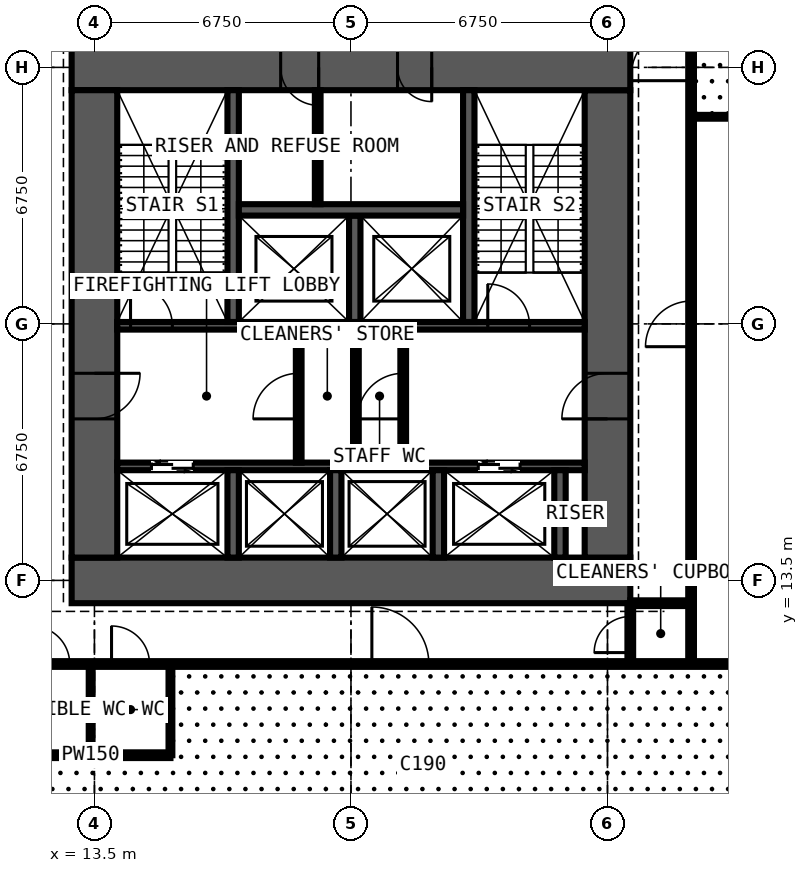
"""IFC4 building model, lengths in metres.
Left out: names, types, materials, properties, quantities, classifications, styles, units other than length and angle.
Written with IfcOpenShell. Run it as: python <this file> out.ifc"""

import sys

from ifc_helpers import new_model, si_unit, direction, frame, frame_2d, origin, place, context, subcontext, project, spatial, rectangle, extrude, element, fill, save


model = new_model("IFC4")
c1 = context("Model", 3, precision=1e-05, world=origin(), true_north=direction((0.0, 1.0)))
c2 = subcontext(c1, "Body", "Model", "MODEL_VIEW")
j1 = project(units=[si_unit("LENGTHUNIT", "METRE"), si_unit("PLANEANGLEUNIT", "RADIAN")], contexts=[c1])
p1 = place(None, origin())
s1 = spatial("IfcSite", under=j1, at=p1, CompositionType="ELEMENT")
p2 = place(p1, origin())
s2 = spatial("IfcBuilding", under=s1, at=p2, CompositionType="ELEMENT")
p3 = place(p2, frame((0.0, 0.0, 9.0)))
s3 = spatial("IfcBuildingStorey", under=s2, at=p3, CompositionType="ELEMENT", Elevation=9.0)
p4 = place(p3, frame((12.9, 13.5, 0.0), z_axis=(0.0, 0.0, 1.0), x_axis=(1.0, 0.0, 0.0)))
e1 = element("IfcWall", 1, at=p4, inside=s3, PredefinedType="SHEAR", context=c2, shape_type="SweptSolid", body=[
    extrude(rectangle(XDim=14.7, YDim=1.2, at=frame_2d((7.35, 0.0))), origin(), (0.0, 0.0, 1.0), 4.5),
])
p5 = place(p3, frame((27.0, 14.1, 0.0), z_axis=(0.0, 0.0, 1.0), x_axis=(0.0, 1.0, 0.0)))
e2 = element("IfcWall", 2, at=p5, inside=s3, PredefinedType="SHEAR", context=c2, shape_type="SweptSolid", body=[
    extrude(rectangle(XDim=12.3, YDim=1.2, at=frame_2d((6.15, 0.0))), origin(), (0.0, 0.0, 1.0), 4.5),
])
p6 = place(p5, frame((3.65, 0.0, 0.0)))
e3 = element("IfcOpeningElement", 3, at=p6, cuts=e2, PredefinedType="OPENING", context=c2, shape_type="SweptSolid", body=[
    extrude(rectangle(XDim=1.2, YDim=2.2, at=frame_2d((0.6, 1.1))), frame((0.0, 0.61, 0.0), z_axis=(0.0, -1.0, 0.0), x_axis=(1.0, 0.0, 0.0)), (0.0, 0.0, 1.0), 1.22),
])
p7 = place(p3, frame((27.6, 27.0, 0.0), z_axis=(0.0, 0.0, 1.0), x_axis=(-1.0, 0.0, 0.0)))
e4 = element("IfcWall", 4, at=p7, inside=s3, PredefinedType="SHEAR", context=c2, shape_type="SweptSolid", body=[
    extrude(rectangle(XDim=14.7, YDim=1.2, at=frame_2d((7.35, 0.0))), origin(), (0.0, 0.0, 1.0), 4.5),
])
p8 = place(p7, frame((5.225, 0.0, 0.0)))
e5 = element("IfcOpeningElement", 5, at=p8, cuts=e4, PredefinedType="OPENING", context=c2, shape_type="SweptSolid", body=[
    extrude(rectangle(XDim=0.9, YDim=2.2, at=frame_2d((0.45, 1.1))), frame((0.0, 0.61, 0.0), z_axis=(0.0, -1.0, 0.0), x_axis=(1.0, 0.0, 0.0)), (0.0, 0.0, 1.0), 1.22),
])
p9 = place(p7, frame((8.2, 0.0, 0.0)))
e6 = element("IfcOpeningElement", 6, at=p9, cuts=e4, PredefinedType="OPENING", context=c2, shape_type="SweptSolid", body=[
    extrude(rectangle(XDim=1.0, YDim=2.2, at=frame_2d((0.5, 1.1))), frame((0.0, 0.61, 0.0), z_axis=(0.0, -1.0, 0.0), x_axis=(1.0, 0.0, 0.0)), (0.0, 0.0, 1.0), 1.22),
])
p10 = place(p3, frame((13.5, 26.4, 0.0), z_axis=(0.0, 0.0, 1.0), x_axis=(0.0, -1.0, 0.0)))
e7 = element("IfcWall", 7, at=p10, inside=s3, PredefinedType="SHEAR", context=c2, shape_type="SweptSolid", body=[
    extrude(rectangle(XDim=12.3, YDim=1.2, at=frame_2d((6.15, 0.0))), origin(), (0.0, 0.0, 1.0), 4.5),
])
p11 = place(p10, frame((7.45, 0.0, 0.0)))
e8 = element("IfcOpeningElement", 8, at=p11, cuts=e7, PredefinedType="OPENING", context=c2, shape_type="SweptSolid", body=[
    extrude(rectangle(XDim=1.2, YDim=2.2, at=frame_2d((0.6, 1.1))), frame((0.0, 0.61, 0.0), z_axis=(0.0, -1.0, 0.0), x_axis=(1.0, 0.0, 0.0)), (0.0, 0.0, 1.0), 1.22),
])
p12 = place(p3, frame((14.1, 16.5, 0.0), z_axis=(0.0, 0.0, 1.0), x_axis=(1.0, 0.0, 0.0)))
e9 = element("IfcWall", 9, at=p12, inside=s3, PredefinedType="SHEAR", context=c2, shape_type="SweptSolid", body=[
    extrude(rectangle(XDim=12.3, YDim=0.2, at=frame_2d((6.15, 0.0))), origin(), (0.0, 0.0, 1.0), 4.5),
])
p13 = place(p12, frame((0.9, 0.0, 0.0)))
e10 = element("IfcOpeningElement", 10, at=p13, cuts=e9, PredefinedType="OPENING", context=c2, shape_type="SweptSolid", body=[
    extrude(rectangle(XDim=1.1, YDim=2.2, at=frame_2d((0.55, 1.1))), frame((0.0, 0.11, 0.0), z_axis=(0.0, -1.0, 0.0), x_axis=(1.0, 0.0, 0.0)), (0.0, 0.0, 1.0), 0.22),
])
p14 = place(p12, frame((9.5, 0.0, 0.0)))
e11 = element("IfcOpeningElement", 11, at=p14, cuts=e9, PredefinedType="OPENING", context=c2, shape_type="SweptSolid", body=[
    extrude(rectangle(XDim=1.1, YDim=2.2, at=frame_2d((0.55, 1.1))), frame((0.0, 0.11, 0.0), z_axis=(0.0, -1.0, 0.0), x_axis=(1.0, 0.0, 0.0)), (0.0, 0.0, 1.0), 0.22),
])
p15 = place(p3, frame((14.1, 20.2, 0.0), z_axis=(0.0, 0.0, 1.0), x_axis=(1.0, 0.0, 0.0)))
e12 = element("IfcWall", 12, at=p15, inside=s3, PredefinedType="SHEAR", context=c2, shape_type="SweptSolid", body=[
    extrude(rectangle(XDim=12.3, YDim=0.2, at=frame_2d((6.15, 0.0))), origin(), (0.0, 0.0, 1.0), 4.5),
])
p16 = place(p15, frame((0.35, 0.0, 0.0)))
e13 = element("IfcOpeningElement", 13, at=p16, cuts=e12, PredefinedType="OPENING", context=c2, shape_type="SweptSolid", body=[
    extrude(rectangle(XDim=1.1, YDim=2.2, at=frame_2d((0.55, 1.1))), frame((0.0, 0.11, 0.0), z_axis=(0.0, -1.0, 0.0), x_axis=(1.0, 0.0, 0.0)), (0.0, 0.0, 1.0), 0.22),
])
p17 = place(p15, frame((9.75, 0.0, 0.0)))
e14 = element("IfcOpeningElement", 14, at=p17, cuts=e12, PredefinedType="OPENING", context=c2, shape_type="SweptSolid", body=[
    extrude(rectangle(XDim=1.1, YDim=2.2, at=frame_2d((0.55, 1.1))), frame((0.0, 0.11, 0.0), z_axis=(0.0, -1.0, 0.0), x_axis=(1.0, 0.0, 0.0)), (0.0, 0.0, 1.0), 0.22),
])
for number, where, z_axis, x_axis in (
    (15, (17.15, 20.3, 0.0), (0.0, 0.0, 1.0), (0.0, 1.0, 0.0)),
    (16, (23.35, 20.3, 0.0), (0.0, 0.0, 1.0), (0.0, 1.0, 0.0)),
):
    element("IfcWall", number, at=place(p3, frame(where, z_axis=z_axis, x_axis=x_axis)), inside=s3, PredefinedType="SHEAR", context=c2, shape_type="SweptSolid", body=[
        extrude(rectangle(XDim=6.1, YDim=0.3, at=frame_2d((3.05, 0.0))), origin(), (0.0, 0.0, 1.0), 4.5),
    ])
p18 = place(p3, frame((20.35, 20.3, 0.0), z_axis=(0.0, 0.0, 1.0), x_axis=(0.0, 1.0, 0.0)))
e17 = element("IfcWall", 17, at=p18, inside=s3, PredefinedType="SHEAR", context=c2, shape_type="SweptSolid", body=[
    extrude(rectangle(XDim=2.8, YDim=0.3, at=frame_2d((1.4, 0.0))), origin(), (0.0, 0.0, 1.0), 4.5),
])
p19 = place(p3, frame((17.3, 23.25, 0.0), z_axis=(0.0, 0.0, 1.0), x_axis=(1.0, 0.0, 0.0)))
e18 = element("IfcWall", 18, at=p19, inside=s3, PredefinedType="SHEAR", context=c2, shape_type="SweptSolid", body=[
    extrude(rectangle(XDim=5.9, YDim=0.3, at=frame_2d((2.95, 0.0))), origin(), (0.0, 0.0, 1.0), 4.5),
])
for number, where, z_axis, x_axis in (
    (19, (17.15, 14.1, 0.0), (0.0, 0.0, 1.0), (0.0, 1.0, 0.0)),
    (20, (19.85, 14.1, 0.0), (0.0, 0.0, 1.0), (0.0, 1.0, 0.0)),
    (21, (22.55, 14.1, 0.0), (0.0, 0.0, 1.0), (0.0, 1.0, 0.0)),
    (22, (25.75, 14.1, 0.0), (0.0, 0.0, 1.0), (0.0, 1.0, 0.0)),
):
    element("IfcWall", number, at=place(p3, frame(where, z_axis=z_axis, x_axis=x_axis)), inside=s3, PredefinedType="SHEAR", context=c2, shape_type="SweptSolid", body=[
        extrude(rectangle(XDim=2.3, YDim=0.3, at=frame_2d((1.15, 0.0))), origin(), (0.0, 0.0, 1.0), 4.5),
    ])
p20 = place(p3, frame((18.875, 16.6, 0.0), z_axis=(0.0, 0.0, 1.0), x_axis=(0.0, 1.0, 0.0)))
e23 = element("IfcWall", 23, at=p20, inside=s3, PredefinedType="PARTITIONING", context=c2, shape_type="SweptSolid", body=[
    extrude(rectangle(XDim=3.5, YDim=0.15, at=frame_2d((1.75, 0.0))), origin(), (0.0, 0.0, 1.0), 4.25),
])
p21 = place(p20, frame((1.15, 0.0, 0.0)))
e24 = element("IfcOpeningElement", 24, at=p21, cuts=e23, PredefinedType="OPENING", context=c2, shape_type="SweptSolid", body=[
    extrude(rectangle(XDim=1.2, YDim=2.2, at=frame_2d((0.6, 1.1))), frame((0.0, 0.085, 0.0), z_axis=(0.0, -1.0, 0.0), x_axis=(1.0, 0.0, 0.0)), (0.0, 0.0, 1.0), 0.17),
])
p22 = place(p3, frame((21.625, 16.6, 0.0), z_axis=(0.0, 0.0, 1.0), x_axis=(0.0, 1.0, 0.0)))
e25 = element("IfcWall", 25, at=p22, inside=s3, PredefinedType="PARTITIONING", context=c2, shape_type="SweptSolid", body=[
    extrude(rectangle(XDim=3.5, YDim=0.15, at=frame_2d((1.75, 0.0))), origin(), (0.0, 0.0, 1.0), 4.25),
])
p23 = place(p22, frame((1.15, 0.0, 0.0)))
e26 = element("IfcOpeningElement", 26, at=p23, cuts=e25, PredefinedType="OPENING", context=c2, shape_type="SweptSolid", body=[
    extrude(rectangle(XDim=1.2, YDim=2.2, at=frame_2d((0.6, 1.1))), frame((0.0, 0.085, 0.0), z_axis=(0.0, -1.0, 0.0), x_axis=(1.0, 0.0, 0.0)), (0.0, 0.0, 1.0), 0.17),
])
p24 = place(p3, frame((20.38, 16.6, 0.0), z_axis=(0.0, 0.0, 1.0), x_axis=(0.0, 1.0, 0.0)))
e27 = element("IfcWall", 27, at=p24, inside=s3, PredefinedType="PARTITIONING", context=c2, shape_type="SweptSolid", body=[
    extrude(rectangle(XDim=3.5, YDim=0.15, at=frame_2d((1.75, 0.0))), origin(), (0.0, 0.0, 1.0), 4.25),
])
p25 = place(p3, frame((19.375, 23.4, 0.0), z_axis=(0.0, 0.0, 1.0), x_axis=(0.0, 1.0, 0.0)))
e28 = element("IfcWall", 28, at=p25, inside=s3, PredefinedType="PARTITIONING", context=c2, shape_type="SweptSolid", body=[
    extrude(rectangle(XDim=3.0, YDim=0.15, at=frame_2d((1.5, 0.0))), origin(), (0.0, 0.0, 1.0), 4.25),
])
p26 = place(p3, frame((10.125, 11.3, 0.0), z_axis=(0.0, 0.0, 1.0), x_axis=(1.0, 0.0, 0.0)))
e29 = element("IfcWall", 29, at=p26, inside=s3, PredefinedType="PARTITIONING", context=c2, shape_type="SweptSolid", body=[
    extrude(rectangle(XDim=20.675, YDim=0.15, at=frame_2d((10.337, 0.0))), origin(), (0.0, 0.0, 1.0), 4.25),
])
p27 = place(p26, frame((1.725, 0.0, 0.0)))
e30 = element("IfcOpeningElement", 30, at=p27, cuts=e29, PredefinedType="OPENING", context=c2, shape_type="SweptSolid", body=[
    extrude(rectangle(XDim=1.0, YDim=2.2, at=frame_2d((0.5, 1.1))), frame((0.0, 0.085, 0.0), z_axis=(0.0, -1.0, 0.0), x_axis=(1.0, 0.0, 0.0)), (0.0, 0.0, 1.0), 0.17),
])
p28 = place(p26, frame((3.825, 0.0, 0.0)))
e31 = element("IfcOpeningElement", 31, at=p28, cuts=e29, PredefinedType="OPENING", context=c2, shape_type="SweptSolid", body=[
    extrude(rectangle(XDim=1.0, YDim=2.2, at=frame_2d((0.5, 1.1))), frame((0.0, 0.085, 0.0), z_axis=(0.0, -1.0, 0.0), x_axis=(1.0, 0.0, 0.0)), (0.0, 0.0, 1.0), 0.17),
])
p29 = place(p26, frame((10.675, 0.0, 0.0)))
e32 = element("IfcOpeningElement", 32, at=p29, cuts=e29, PredefinedType="OPENING", context=c2, shape_type="SweptSolid", body=[
    extrude(rectangle(XDim=1.5, YDim=2.2, at=frame_2d((0.75, 1.1))), frame((0.0, 0.085, 0.0), z_axis=(0.0, -1.0, 0.0), x_axis=(1.0, 0.0, 0.0)), (0.0, 0.0, 1.0), 0.17),
])
p30 = place(p3, frame((11.3, 8.9, 0.0), z_axis=(0.0, 0.0, 1.0), x_axis=(1.0, 0.0, 0.0)))
e33 = element("IfcWall", 33, at=p30, inside=s3, PredefinedType="PARTITIONING", context=c2, shape_type="SweptSolid", body=[
    extrude(rectangle(XDim=4.2, YDim=0.15, at=frame_2d((2.1, 0.0))), origin(), (0.0, 0.0, 1.0), 4.25),
])
p31 = place(p3, frame((13.4, 8.9, 0.0), z_axis=(0.0, 0.0, 1.0), x_axis=(0.0, 1.0, 0.0)))
e34 = element("IfcWall", 34, at=p31, inside=s3, PredefinedType="PARTITIONING", context=c2, shape_type="SweptSolid", body=[
    extrude(rectangle(XDim=2.4, YDim=0.1, at=frame_2d((1.2, 0.0))), origin(), (0.0, 0.0, 1.0), 3.752),
])
p32 = place(p3, frame((15.5, 8.9, 0.0), z_axis=(0.0, 0.0, 1.0), x_axis=(0.0, 1.0, 0.0)))
e35 = element("IfcWall", 35, at=p32, inside=s3, PredefinedType="PARTITIONING", context=c2, shape_type="SweptSolid", body=[
    extrude(rectangle(XDim=2.4, YDim=0.1, at=frame_2d((1.2, 0.0))), origin(), (0.0, 0.0, 1.0), 4.25),
])
p33 = place(p3, frame((27.6, 11.3, 0.0), z_axis=(0.0, 0.0, 1.0), x_axis=(0.0, 1.0, 0.0)))
e36 = element("IfcWall", 36, at=p33, inside=s3, PredefinedType="PARTITIONING", context=c2, shape_type="SweptSolid", body=[
    extrude(rectangle(XDim=1.6, YDim=0.15, at=frame_2d((0.8, 0.0))), origin(), (0.0, 0.0, 1.0), 4.25),
])
p34 = place(p33, frame((0.3, 0.0, 0.0)))
e37 = element("IfcOpeningElement", 37, at=p34, cuts=e36, PredefinedType="OPENING", context=c2, shape_type="SweptSolid", body=[
    extrude(rectangle(XDim=0.95, YDim=2.2, at=frame_2d((0.475, 1.1))), frame((0.0, 0.085, 0.0), z_axis=(0.0, -1.0, 0.0), x_axis=(1.0, 0.0, 0.0)), (0.0, 0.0, 1.0), 0.17),
])
p35 = place(p3, frame((27.6, 12.9, 0.0), z_axis=(0.0, 0.0, 1.0), x_axis=(1.0, 0.0, 0.0)))
e38 = element("IfcWall", 38, at=p35, inside=s3, PredefinedType="PARTITIONING", context=c2, shape_type="SweptSolid", body=[
    extrude(rectangle(XDim=1.6, YDim=0.15, at=frame_2d((0.8, 0.0))), origin(), (0.0, 0.0, 1.0), 3.752),
])
p36 = place(p3, frame((29.2, 11.3, 0.0), z_axis=(0.0, 0.0, 1.0), x_axis=(0.0, 1.0, 0.0)))
e39 = element("IfcWall", 39, at=p36, inside=s3, PredefinedType="PARTITIONING", context=c2, shape_type="SweptSolid", body=[
    extrude(rectangle(XDim=20.3, YDim=0.15, at=frame_2d((10.15, 0.0))), origin(), (0.0, 0.0, 1.0), 4.25),
])
p37 = place(p36, frame((15.35, 0.0, 0.0)))
e40 = element("IfcOpeningElement", 40, at=p37, cuts=e39, PredefinedType="OPENING", context=c2, shape_type="SweptSolid", body=[
    extrude(rectangle(XDim=1.6, YDim=2.4, at=frame_2d((0.8, 1.2))), frame((0.0, 0.085, 0.0), z_axis=(0.0, -1.0, 0.0), x_axis=(1.0, 0.0, 0.0)), (0.0, 0.0, 1.0), 0.17),
])
p38 = place(p36, frame((8.35, 0.0, 0.0)))
e41 = element("IfcOpeningElement", 41, at=p38, cuts=e39, PredefinedType="OPENING", context=c2, shape_type="SweptSolid", body=[
    extrude(rectangle(XDim=1.2, YDim=2.2, at=frame_2d((0.6, 1.1))), frame((0.0, 0.085, 0.0), z_axis=(0.0, -1.0, 0.0), x_axis=(1.0, 0.0, 0.0)), (0.0, 0.0, 1.0), 0.17),
])
p39 = place(p3, frame((29.2, 25.7, 0.0), z_axis=(0.0, 0.0, 1.0), x_axis=(1.0, 0.0, 0.0)))
e42 = element("IfcWall", 42, at=p39, inside=s3, PredefinedType="SHEAR", context=c2, shape_type="SweptSolid", body=[
    extrude(rectangle(XDim=3.45, YDim=0.1, at=frame_2d((1.725, 0.0))), origin(), (0.0, 0.0, 1.0), 4.25),
])
p40 = place(p13, origin())
e43 = element("IfcDoor", 43, at=p40, inside=s3, OperationType="DOUBLE_DOOR_SLIDING", PredefinedType="DOOR", context=c2, shape_type="SweptSolid", body=[
    extrude(rectangle(XDim=1.1, YDim=2.2, at=frame_2d((0.55, 1.1))), frame((0.0, 0.025, 0.0), z_axis=(0.0, -1.0, 0.0), x_axis=(1.0, 0.0, 0.0)), (0.0, 0.0, 1.0), 0.05),
])
fill(e10, e43)
p41 = place(p14, origin())
e44 = element("IfcDoor", 44, at=p41, inside=s3, OperationType="DOUBLE_DOOR_SLIDING", PredefinedType="DOOR", context=c2, shape_type="SweptSolid", body=[
    extrude(rectangle(XDim=1.1, YDim=2.2, at=frame_2d((0.55, 1.1))), frame((0.0, 0.025, 0.0), z_axis=(0.0, -1.0, 0.0), x_axis=(1.0, 0.0, 0.0)), (0.0, 0.0, 1.0), 0.05),
])
fill(e11, e44)
p42 = place(p11, origin())
e45 = element("IfcDoor", 45, at=p42, inside=s3, OperationType="DOUBLE_DOOR_SINGLE_SWING", PredefinedType="DOOR", context=c2, shape_type="SweptSolid", body=[
    extrude(rectangle(XDim=1.2, YDim=2.2, at=frame_2d((0.6, 1.1))), frame((0.0, 0.025, 0.0), z_axis=(0.0, -1.0, 0.0), x_axis=(1.0, 0.0, 0.0)), (0.0, 0.0, 1.0), 0.05),
])
fill(e8, e45)
p43 = place(p6, origin())
e46 = element("IfcDoor", 46, at=p43, inside=s3, OperationType="DOUBLE_DOOR_SINGLE_SWING", PredefinedType="DOOR", context=c2, shape_type="SweptSolid", body=[
    extrude(rectangle(XDim=1.2, YDim=2.2, at=frame_2d((0.6, 1.1))), frame((0.0, 0.025, 0.0), z_axis=(0.0, -1.0, 0.0), x_axis=(1.0, 0.0, 0.0)), (0.0, 0.0, 1.0), 0.05),
])
fill(e3, e46)
p44 = place(p21, origin())
e47 = element("IfcDoor", 47, at=p44, inside=s3, OperationType="DOUBLE_DOOR_SINGLE_SWING", PredefinedType="DOOR", context=c2, shape_type="SweptSolid", body=[
    extrude(rectangle(XDim=1.2, YDim=2.2, at=frame_2d((0.6, 1.1))), frame((0.0, 0.025, 0.0), z_axis=(0.0, -1.0, 0.0), x_axis=(1.0, 0.0, 0.0)), (0.0, 0.0, 1.0), 0.05),
])
fill(e24, e47)
p45 = place(p23, origin())
e48 = element("IfcDoor", 48, at=p45, inside=s3, OperationType="DOUBLE_DOOR_SINGLE_SWING", PredefinedType="DOOR", context=c2, shape_type="SweptSolid", body=[
    extrude(rectangle(XDim=1.2, YDim=2.2, at=frame_2d((0.6, 1.1))), frame((0.0, 0.025, 0.0), z_axis=(0.0, -1.0, 0.0), x_axis=(1.0, 0.0, 0.0)), (0.0, 0.0, 1.0), 0.05),
])
fill(e26, e48)
p46 = place(p8, origin())
e49 = element("IfcDoor", 49, at=p46, inside=s3, OperationType="SINGLE_SWING_LEFT", PredefinedType="DOOR", context=c2, shape_type="SweptSolid", body=[
    extrude(rectangle(XDim=0.9, YDim=2.2, at=frame_2d((0.45, 1.1))), frame((0.0, 0.4, 0.0), z_axis=(0.0, -1.0, 0.0), x_axis=(1.0, 0.0, 0.0)), (0.0, 0.0, 1.0), 0.8),
])
fill(e5, e49)
p47 = place(p9, origin())
e50 = element("IfcDoor", 50, at=p47, inside=s3, OperationType="SINGLE_SWING_LEFT", PredefinedType="DOOR", context=c2, shape_type="SweptSolid", body=[
    extrude(rectangle(XDim=1.0, YDim=2.2, at=frame_2d((0.5, 1.1))), frame((0.0, 0.025, 0.0), z_axis=(0.0, -1.0, 0.0), x_axis=(1.0, 0.0, 0.0)), (0.0, 0.0, 1.0), 0.05),
])
fill(e6, e50)
p48 = place(p16, origin())
e51 = element("IfcDoor", 51, at=p48, inside=s3, OperationType="SINGLE_SWING_LEFT", PredefinedType="DOOR", context=c2, shape_type="SweptSolid", body=[
    extrude(rectangle(XDim=1.1, YDim=2.2, at=frame_2d((0.55, 1.1))), frame((0.0, 0.025, 0.0), z_axis=(0.0, -1.0, 0.0), x_axis=(1.0, 0.0, 0.0)), (0.0, 0.0, 1.0), 0.05),
])
fill(e13, e51)
p49 = place(p17, origin())
e52 = element("IfcDoor", 52, at=p49, inside=s3, OperationType="SINGLE_SWING_LEFT", PredefinedType="DOOR", context=c2, shape_type="SweptSolid", body=[
    extrude(rectangle(XDim=1.1, YDim=2.2, at=frame_2d((0.55, 1.1))), frame((0.0, 0.025, 0.0), z_axis=(0.0, -1.0, 0.0), x_axis=(1.0, 0.0, 0.0)), (0.0, 0.0, 1.0), 0.05),
])
fill(e14, e52)
p50 = place(p34, origin())
e53 = element("IfcDoor", 53, at=p50, inside=s3, OperationType="SINGLE_SWING_LEFT", PredefinedType="DOOR", context=c2, shape_type="SweptSolid", body=[
    extrude(rectangle(XDim=0.95, YDim=2.2, at=frame_2d((0.475, 1.1))), frame((0.0, 0.025, 0.0), z_axis=(0.0, -1.0, 0.0), x_axis=(1.0, 0.0, 0.0)), (0.0, 0.0, 1.0), 0.05),
])
fill(e37, e53)
p51 = place(p27, origin())
e54 = element("IfcDoor", 54, at=p51, inside=s3, OperationType="SINGLE_SWING_LEFT", PredefinedType="DOOR", context=c2, shape_type="SweptSolid", body=[
    extrude(rectangle(XDim=1.0, YDim=2.2, at=frame_2d((0.5, 1.1))), frame((0.0, 0.025, 0.0), z_axis=(0.0, -1.0, 0.0), x_axis=(1.0, 0.0, 0.0)), (0.0, 0.0, 1.0), 0.05),
])
fill(e30, e54)
p52 = place(p28, origin())
e55 = element("IfcDoor", 55, at=p52, inside=s3, OperationType="SINGLE_SWING_LEFT", PredefinedType="DOOR", context=c2, shape_type="SweptSolid", body=[
    extrude(rectangle(XDim=1.0, YDim=2.2, at=frame_2d((0.5, 1.1))), frame((0.0, 0.025, 0.0), z_axis=(0.0, -1.0, 0.0), x_axis=(1.0, 0.0, 0.0)), (0.0, 0.0, 1.0), 0.05),
])
fill(e31, e55)
p53 = place(p29, origin())
e56 = element("IfcDoor", 56, at=p53, inside=s3, OperationType="DOUBLE_DOOR_SINGLE_SWING", PredefinedType="DOOR", context=c2, shape_type="SweptSolid", body=[
    extrude(rectangle(XDim=1.5, YDim=2.2, at=frame_2d((0.75, 1.1))), frame((0.0, 0.025, 0.0), z_axis=(0.0, -1.0, 0.0), x_axis=(1.0, 0.0, 0.0)), (0.0, 0.0, 1.0), 0.05),
])
fill(e32, e56)
p54 = place(p37, origin())
e57 = element("IfcDoor", 57, at=p54, inside=s3, OperationType="DOUBLE_DOOR_SINGLE_SWING", PredefinedType="DOOR", context=c2, shape_type="SweptSolid", body=[
    extrude(rectangle(XDim=1.6, YDim=2.4, at=frame_2d((0.8, 1.2))), frame((0.0, 0.025, 0.0), z_axis=(0.0, -1.0, 0.0), x_axis=(1.0, 0.0, 0.0)), (0.0, 0.0, 1.0), 0.05),
])
fill(e40, e57)
p55 = place(p38, origin())
e58 = element("IfcDoor", 58, at=p55, inside=s3, OperationType="DOUBLE_DOOR_SINGLE_SWING", PredefinedType="DOOR", context=c2, shape_type="SweptSolid", body=[
    extrude(rectangle(XDim=1.2, YDim=2.2, at=frame_2d((0.6, 1.1))), frame((0.0, 0.025, 0.0), z_axis=(0.0, -1.0, 0.0), x_axis=(1.0, 0.0, 0.0)), (0.0, 0.0, 1.0), 0.05),
])
fill(e41, e58)
save(model, sys.argv[1])
